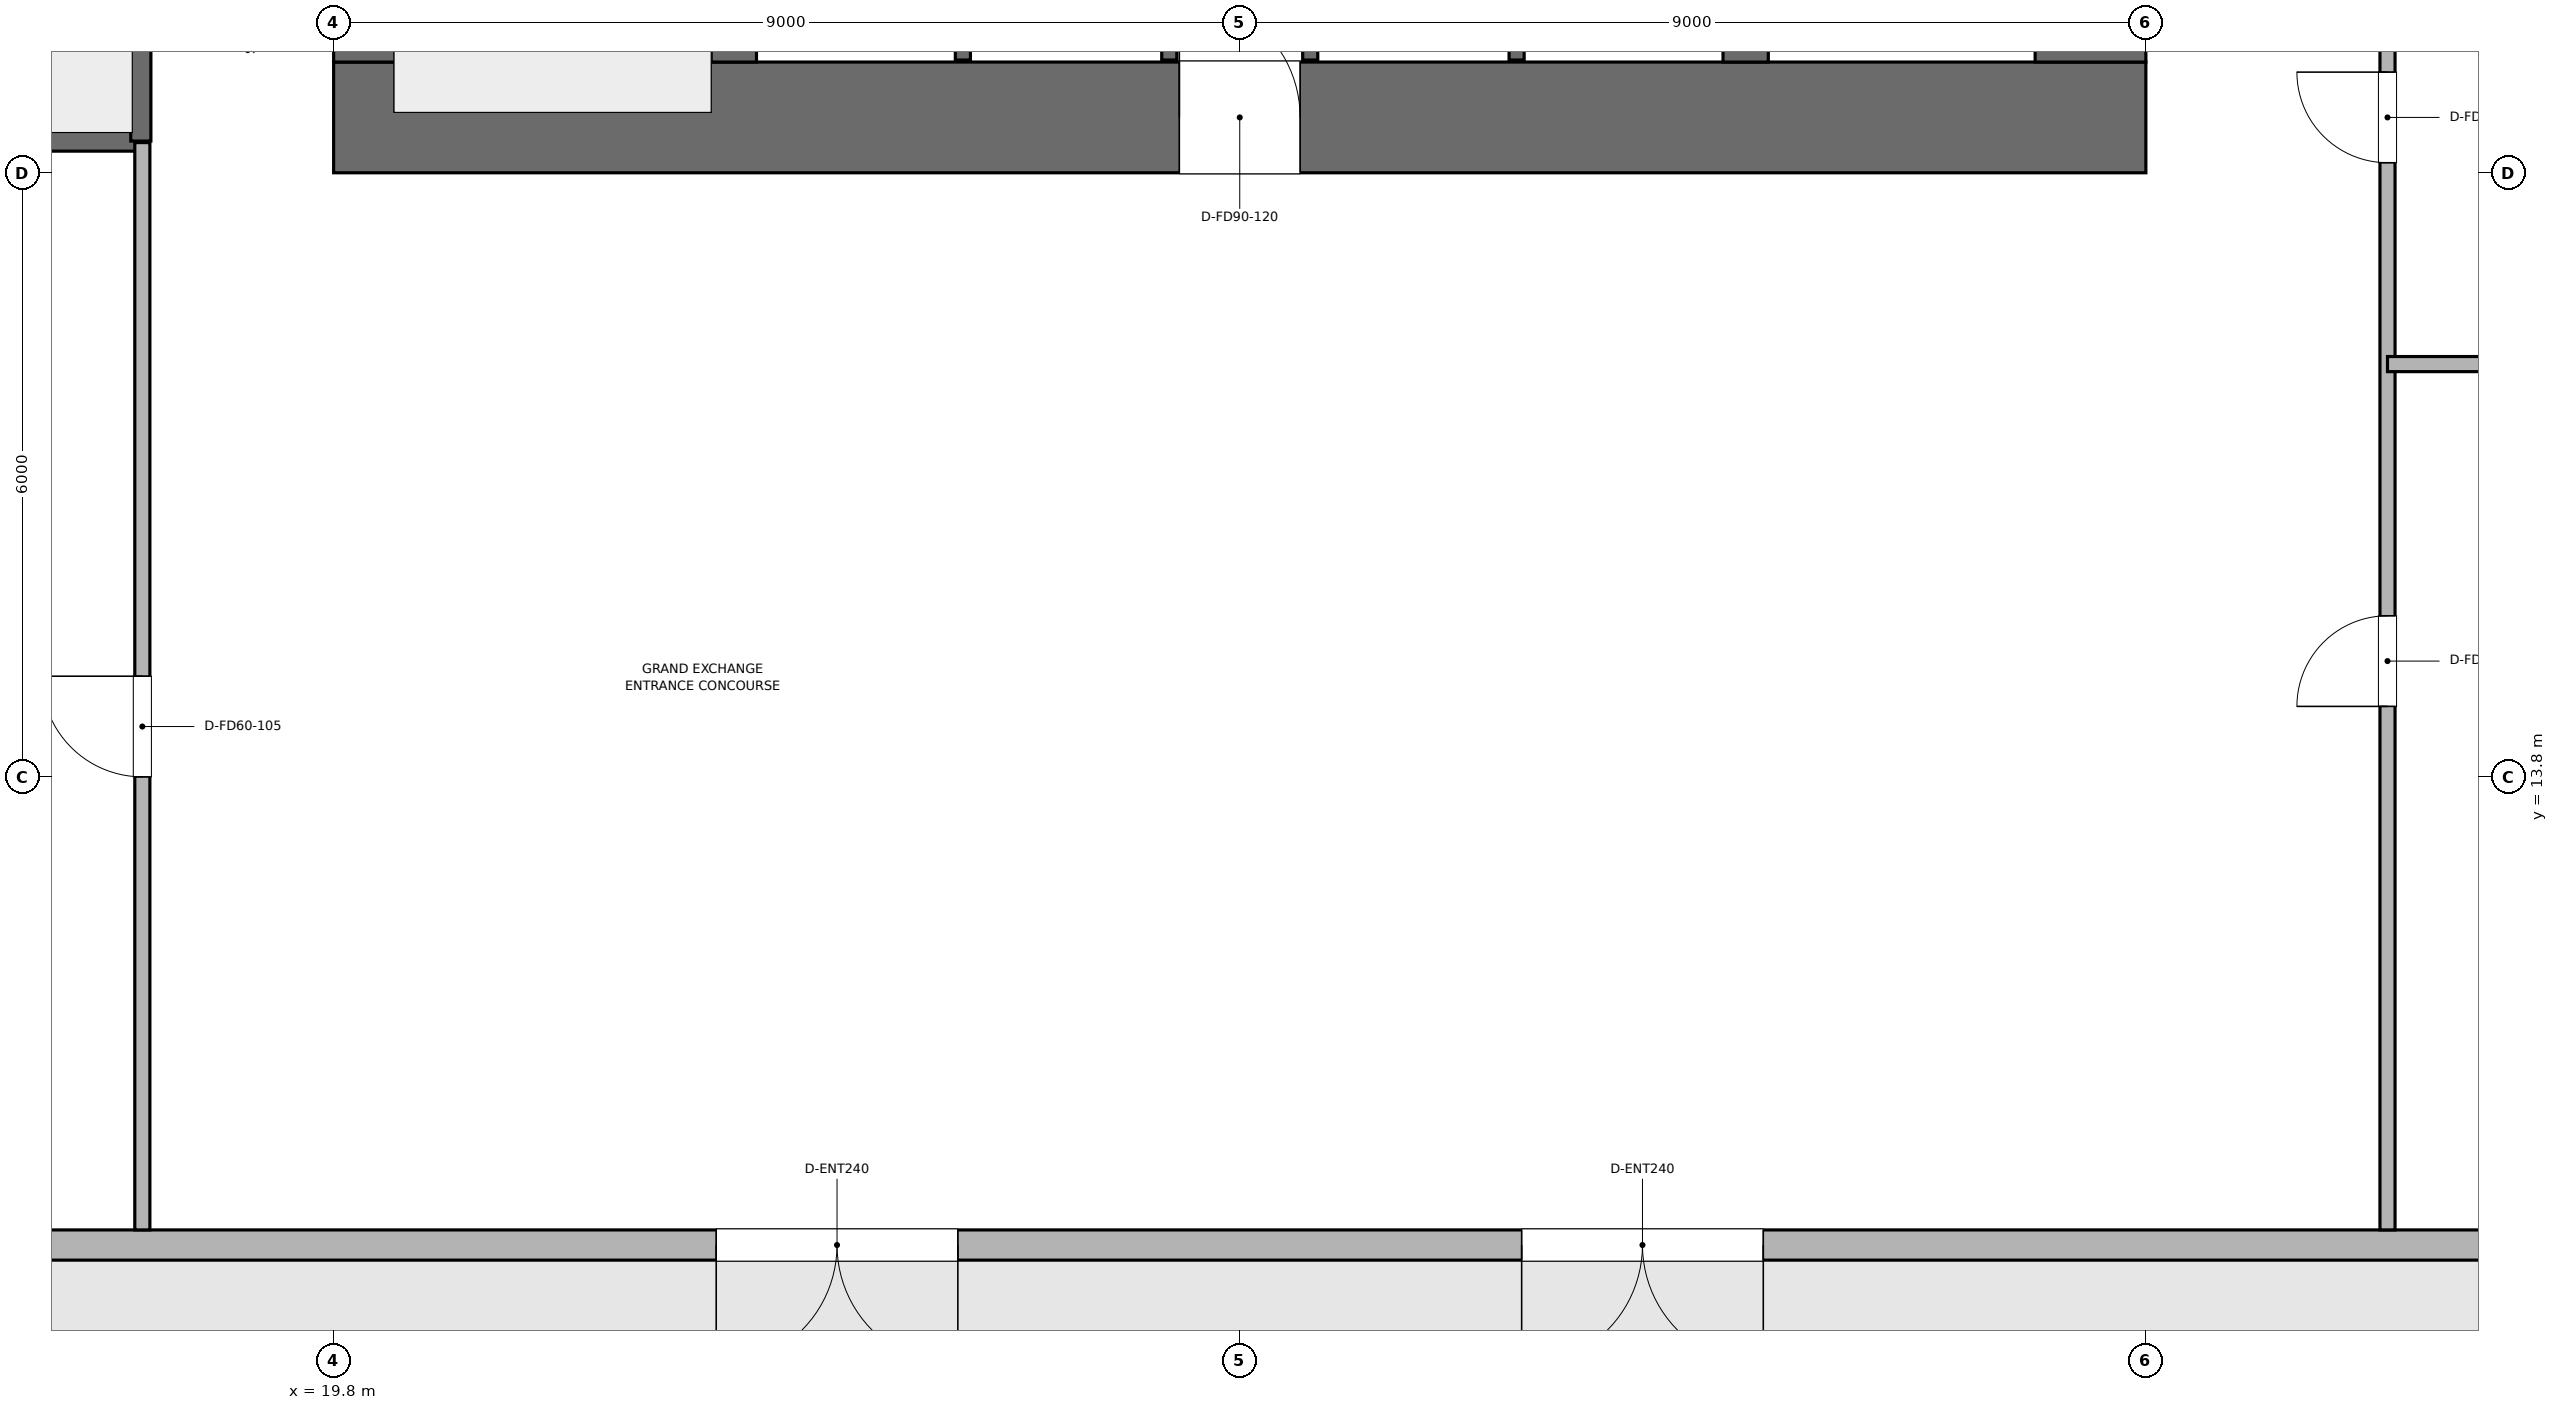
"""IFC4 building model, lengths in metres.
Left out: names, types, materials, properties, quantities, classifications, styles, units other than length and angle.
Written with IfcOpenShell. Run it as: python <this file> out.ifc"""

import sys

from ifc_helpers import new_model, si_unit, direction, frame, frame_2d, origin, place, context, subcontext, project, spatial, rectangle, extrude, element, fill, save


model = new_model("IFC4")
c1 = context("Model", 3, precision=1e-05, world=origin(), true_north=direction((0.0, 1.0)))
c2 = subcontext(c1, "Body", "Model", "MODEL_VIEW")
j1 = project(units=[si_unit("LENGTHUNIT", "METRE"), si_unit("PLANEANGLEUNIT", "RADIAN")], contexts=[c1])
p1 = place(None, origin())
s1 = spatial("IfcSite", under=j1, at=p1, CompositionType="ELEMENT")
p2 = place(p1, origin())
s2 = spatial("IfcBuilding", under=s1, at=p2, CompositionType="ELEMENT")
p3 = place(p2, origin())
s3 = spatial("IfcBuildingStorey", under=s2, at=p3, CompositionType="ELEMENT", Elevation=0.0)
p4 = place(p3, frame((19.8, 20.35, 0.0), z_axis=(0.0, 0.0, 1.0), x_axis=(1.0, 0.0, 0.0)))
e1 = element("IfcWall", 1, at=p4, inside=s3, PredefinedType="SHEAR", context=c2, shape_type="SweptSolid", body=[
    extrude(rectangle(XDim=18.0, YDim=1.1, at=frame_2d((9.0, 0.0))), origin(), (0.0, 0.0, 1.0), 8.4),
])
p5 = place(p4, frame((8.4, 0.0, 0.0)))
e2 = element("IfcOpeningElement", 2, at=p5, cuts=e1, PredefinedType="OPENING", context=c2, shape_type="SweptSolid", body=[
    extrude(rectangle(XDim=1.2, YDim=2.2, at=frame_2d((0.6, 1.1))), frame((0.0, 0.56, 0.0), z_axis=(0.0, -1.0, 0.0), x_axis=(1.0, 0.0, 0.0)), (0.0, 0.0, 1.0), 1.12),
])
p6 = place(p3, frame((20.35, 20.9, 0.0), z_axis=(0.0, 0.0, 1.0), x_axis=(0.0, 1.0, 0.0)))
e3 = element("IfcWall", 3, at=p6, inside=s3, PredefinedType="SHEAR", context=c2, shape_type="SweptSolid", body=[
    extrude(rectangle(XDim=15.8, YDim=1.1, at=frame_2d((7.9, 0.0))), origin(), (0.0, 0.0, 1.0), 8.4),
])
p7 = place(p6, frame((9.9, 0.0, 0.0)))
e4 = element("IfcOpeningElement", 4, at=p7, cuts=e3, PredefinedType="OPENING", context=c2, shape_type="SweptSolid", body=[
    extrude(rectangle(XDim=1.1, YDim=2.15, at=frame_2d((0.55, 1.075))), frame((0.0, 0.56, 0.0), z_axis=(0.0, -1.0, 0.0), x_axis=(1.0, 0.0, 0.0)), (0.0, 0.0, 1.0), 1.12),
])
p8 = place(p3, frame((37.25, 20.9, 0.0), z_axis=(0.0, 0.0, 1.0), x_axis=(0.0, 1.0, 0.0)))
e5 = element("IfcWall", 5, at=p8, inside=s3, PredefinedType="SHEAR", context=c2, shape_type="SweptSolid", body=[
    extrude(rectangle(XDim=15.8, YDim=1.1, at=frame_2d((7.9, 0.0))), origin(), (0.0, 0.0, 1.0), 8.4),
])
p9 = place(p8, frame((4.4, 0.0, 0.0)))
e6 = element("IfcOpeningElement", 6, at=p9, cuts=e5, PredefinedType="OPENING", context=c2, shape_type="SweptSolid", body=[
    extrude(rectangle(XDim=1.1, YDim=2.15, at=frame_2d((0.55, 1.075))), frame((0.0, 0.56, 0.0), z_axis=(0.0, -1.0, 0.0), x_axis=(1.0, 0.0, 0.0)), (0.0, 0.0, 1.0), 1.12),
])
for number, where, z_axis, x_axis in (
    (7, (23.775, 20.9, 0.0), (0.0, 0.0, 1.0), (0.0, 1.0, 0.0)),
    (8, (33.825, 20.9, 0.0), (0.0, 0.0, 1.0), (0.0, 1.0, 0.0)),
):
    element("IfcWall", number, at=place(p3, frame(where, z_axis=z_axis, x_axis=x_axis)), inside=s3, PredefinedType="SHEAR", context=c2, shape_type="SweptSolid", body=[
        extrude(rectangle(XDim=15.8, YDim=0.45, at=frame_2d((7.9, 0.0))), origin(), (0.0, 0.0, 1.0), 8.4),
    ])
p10 = place(p3, frame((46.2, 9.15, 0.0), z_axis=(0.0, 0.0, 1.0), x_axis=(-1.0, 0.0, 0.0)))
e9 = element("IfcWall", 9, at=p10, inside=s3, PredefinedType="SOLIDWALL", context=c2, shape_type="SweptSolid", body=[
    extrude(rectangle(XDim=34.8, YDim=0.3, at=frame_2d((17.4, 0.0))), origin(), (0.0, 0.0, 1.0), 8.05),
])
p11 = place(p10, frame((12.2, 0.0, 0.0)))
e10 = element("IfcOpeningElement", 10, at=p11, cuts=e9, PredefinedType="OPENING", context=c2, shape_type="SweptSolid", body=[
    extrude(rectangle(XDim=2.4, YDim=2.6, at=frame_2d((1.2, 1.3))), frame((0.0, 0.16, 0.0), z_axis=(0.0, -1.0, 0.0), x_axis=(1.0, 0.0, 0.0)), (0.0, 0.0, 1.0), 0.32),
])
p12 = place(p10, frame((20.2, 0.0, 0.0)))
e11 = element("IfcOpeningElement", 11, at=p12, cuts=e9, PredefinedType="OPENING", context=c2, shape_type="SweptSolid", body=[
    extrude(rectangle(XDim=2.4, YDim=2.6, at=frame_2d((1.2, 1.3))), frame((0.0, 0.16, 0.0), z_axis=(0.0, -1.0, 0.0), x_axis=(1.0, 0.0, 0.0)), (0.0, 0.0, 1.0), 0.32),
])
for number, where, z_axis, x_axis in (
    (12, (26.05, 20.92, 0.0), (0.0, 0.0, 1.0), (0.0, 1.0, 0.0)),
    (13, (28.1, 20.92, 0.0), (0.0, 0.0, 1.0), (0.0, 1.0, 0.0)),
    (14, (29.5, 20.92, 0.0), (0.0, 0.0, 1.0), (0.0, 1.0, 0.0)),
    (15, (31.55, 20.92, 0.0), (0.0, 0.0, 1.0), (0.0, 1.0, 0.0)),
):
    element("IfcWall", number, at=place(p3, frame(where, z_axis=z_axis, x_axis=x_axis)), inside=s3, PredefinedType="SHEAR", context=c2, shape_type="SweptSolid", body=[
        extrude(rectangle(XDim=2.06, YDim=0.15, at=frame_2d((1.03, 0.0))), origin(), (0.0, 0.0, 1.0), 8.05),
    ])
p13 = place(p3, frame((9.315, 20.115, 0.0), z_axis=(0.0, 0.0, 1.0), x_axis=(1.0, 0.0, 0.0)))
e16 = element("IfcWall", 16, at=p13, inside=s3, PredefinedType="SHEAR", context=c2, shape_type="SweptSolid", body=[
    extrude(rectangle(XDim=8.57, YDim=0.2, at=frame_2d((4.285, 0.0))), origin(), (0.0, 0.0, 1.0), 8.398),
])
p14 = place(p3, frame((17.885, 20.115, 0.0), z_axis=(0.0, 0.0, 1.0), x_axis=(0.0, 1.0, 0.0)))
e17 = element("IfcWall", 17, at=p14, inside=s3, PredefinedType="SHEAR", context=c2, shape_type="SweptSolid", body=[
    extrude(rectangle(XDim=3.32, YDim=0.2, at=frame_2d((1.66, 0.0))), origin(), (0.0, 0.0, 1.0), 8.398),
])
p15 = place(p3, frame((17.9, 9.3, 0.0), z_axis=(0.0, 0.0, 1.0), x_axis=(0.0, 1.0, 0.0)))
e18 = element("IfcWall", 18, at=p15, inside=s3, PredefinedType="PARTITIONING", context=c2, shape_type="SweptSolid", body=[
    extrude(rectangle(XDim=10.8, YDim=0.15, at=frame_2d((5.4, 0.0))), origin(), (0.0, 0.0, 1.0), 7.135),
])
p16 = place(p15, frame((4.5, 0.0, 0.0)))
e19 = element("IfcOpeningElement", 19, at=p16, cuts=e18, PredefinedType="OPENING", context=c2, shape_type="SweptSolid", body=[
    extrude(rectangle(XDim=1.0, YDim=2.15, at=frame_2d((0.5, 1.075))), frame((0.0, 0.085, 0.0), z_axis=(0.0, -1.0, 0.0), x_axis=(1.0, 0.0, 0.0)), (0.0, 0.0, 1.0), 0.17),
])
p17 = place(p3, frame((40.2, 9.3, 0.0), z_axis=(0.0, 0.0, 1.0), x_axis=(0.0, 1.0, 0.0)))
e20 = element("IfcWall", 20, at=p17, inside=s3, PredefinedType="PARTITIONING", context=c2, shape_type="SweptSolid", body=[
    extrude(rectangle(XDim=14.0, YDim=0.15, at=frame_2d((7.0, 0.0))), origin(), (0.0, 0.0, 1.0), 7.135),
])
p18 = place(p17, frame((5.2, 0.0, 0.0)))
e21 = element("IfcOpeningElement", 21, at=p18, cuts=e20, PredefinedType="OPENING", context=c2, shape_type="SweptSolid", body=[
    extrude(rectangle(XDim=0.9, YDim=2.1, at=frame_2d((0.45, 1.05))), frame((0.0, 0.085, 0.0), z_axis=(0.0, -1.0, 0.0), x_axis=(1.0, 0.0, 0.0)), (0.0, 0.0, 1.0), 0.17),
])
p19 = place(p17, frame((10.6, 0.0, 0.0)))
e22 = element("IfcOpeningElement", 22, at=p19, cuts=e20, PredefinedType="OPENING", context=c2, shape_type="SweptSolid", body=[
    extrude(rectangle(XDim=0.9, YDim=2.1, at=frame_2d((0.45, 1.05))), frame((0.0, 0.085, 0.0), z_axis=(0.0, -1.0, 0.0), x_axis=(1.0, 0.0, 0.0)), (0.0, 0.0, 1.0), 0.17),
])
p20 = place(p3, frame((40.2, 17.9, 0.0), z_axis=(0.0, 0.0, 1.0), x_axis=(1.0, 0.0, 0.0)))
e23 = element("IfcWall", 23, at=p20, inside=s3, PredefinedType="PARTITIONING", context=c2, shape_type="SweptSolid", body=[
    extrude(rectangle(XDim=8.1, YDim=0.15, at=frame_2d((4.05, 0.0))), origin(), (0.0, 0.0, 1.0), 8.05),
])
p21 = place(p11, origin())
e24 = element("IfcDoor", 24, at=p21, inside=s3, OperationType="DOUBLE_DOOR_SINGLE_SWING", PredefinedType="DOOR", context=c2, shape_type="SweptSolid", body=[
    extrude(rectangle(XDim=2.4, YDim=2.6, at=frame_2d((1.2, 1.3))), frame((0.0, 0.025, 0.0), z_axis=(0.0, -1.0, 0.0), x_axis=(1.0, 0.0, 0.0)), (0.0, 0.0, 1.0), 0.05),
])
fill(e10, e24)
p22 = place(p12, origin())
e25 = element("IfcDoor", 25, at=p22, inside=s3, OperationType="DOUBLE_DOOR_SINGLE_SWING", PredefinedType="DOOR", context=c2, shape_type="SweptSolid", body=[
    extrude(rectangle(XDim=2.4, YDim=2.6, at=frame_2d((1.2, 1.3))), frame((0.0, 0.025, 0.0), z_axis=(0.0, -1.0, 0.0), x_axis=(1.0, 0.0, 0.0)), (0.0, 0.0, 1.0), 0.05),
])
fill(e11, e25)
p23 = place(p16, origin())
e26 = element("IfcDoor", 26, at=p23, inside=s3, OperationType="SINGLE_SWING_RIGHT", PredefinedType="DOOR", context=c2, shape_type="SweptSolid", body=[
    extrude(rectangle(XDim=1.0, YDim=2.15, at=frame_2d((0.5, 1.075))), frame((0.0, 0.025, 0.0), z_axis=(0.0, -1.0, 0.0), x_axis=(1.0, 0.0, 0.0)), (0.0, 0.0, 1.0), 0.05),
])
fill(e19, e26)
p24 = place(p18, origin())
e27 = element("IfcDoor", 27, at=p24, inside=s3, OperationType="SINGLE_SWING_LEFT", PredefinedType="DOOR", context=c2, shape_type="SweptSolid", body=[
    extrude(rectangle(XDim=0.9, YDim=2.1, at=frame_2d((0.45, 1.05))), frame((0.0, 0.025, 0.0), z_axis=(0.0, -1.0, 0.0), x_axis=(1.0, 0.0, 0.0)), (0.0, 0.0, 1.0), 0.05),
])
fill(e21, e27)
p25 = place(p19, origin())
e28 = element("IfcDoor", 28, at=p25, inside=s3, OperationType="SINGLE_SWING_RIGHT", PredefinedType="DOOR", context=c2, shape_type="SweptSolid", body=[
    extrude(rectangle(XDim=0.9, YDim=2.1, at=frame_2d((0.45, 1.05))), frame((0.0, 0.025, 0.0), z_axis=(0.0, -1.0, 0.0), x_axis=(1.0, 0.0, 0.0)), (0.0, 0.0, 1.0), 0.05),
])
fill(e22, e28)
p26 = place(p5, origin())
e29 = element("IfcDoor", 29, at=p26, inside=s3, OperationType="SINGLE_SWING_LEFT", PredefinedType="DOOR", context=c2, shape_type="SweptSolid", body=[
    extrude(rectangle(XDim=1.2, YDim=2.2, at=frame_2d((0.6, 1.1))), frame((0.0, 0.025, 0.0), z_axis=(0.0, -1.0, 0.0), x_axis=(1.0, 0.0, 0.0)), (0.0, 0.0, 1.0), 0.05),
])
fill(e2, e29)
save(model, sys.argv[1])
